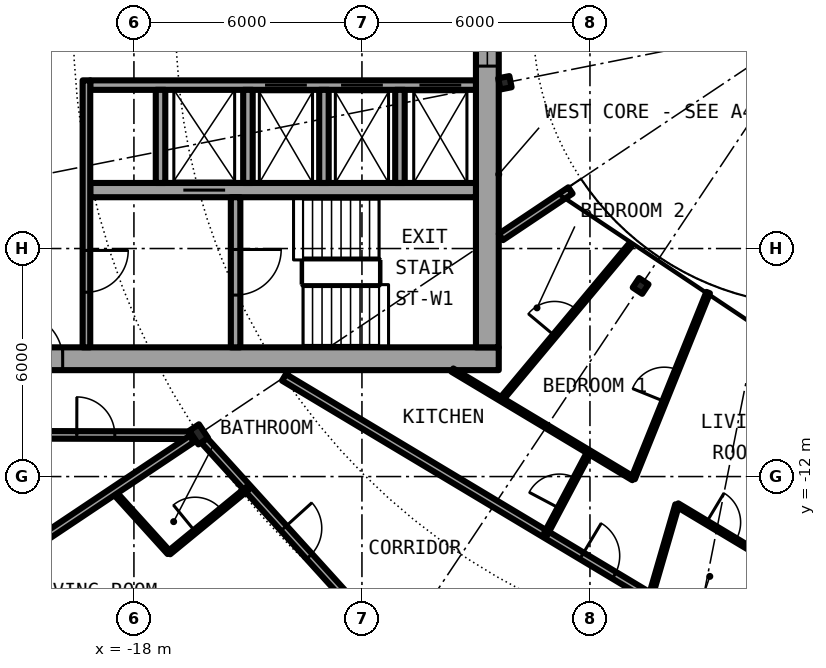
"""IFC4 building model, lengths in metres.
Left out: names, types, materials, properties, quantities, classifications, styles, units other than length and angle.
Written with IfcOpenShell. Run it as: python <this file> out.ifc"""

import sys

from ifc_helpers import new_model, si_unit, direction, frame, frame_2d, origin, origin_2d, place, context, subcontext, project, spatial, rectangle, i_section, extrude, element, fill, save


model = new_model("IFC4")
c1 = context("Model", 3, precision=1e-05, world=origin(), true_north=direction((0.0, 1.0)))
c2 = subcontext(c1, "Body", "Model", "MODEL_VIEW")
j1 = project(units=[si_unit("LENGTHUNIT", "METRE"), si_unit("PLANEANGLEUNIT", "RADIAN")], contexts=[c1])
p1 = place(None, origin())
s1 = spatial("IfcSite", under=j1, at=p1, CompositionType="ELEMENT")
p2 = place(p1, origin())
s2 = spatial("IfcBuilding", under=s1, at=p2, CompositionType="ELEMENT")
p3 = place(p2, frame((0.0, 0.0, 120.8)))
s3 = spatial("IfcBuildingStorey", under=s2, at=p3, CompositionType="ELEMENT", Elevation=120.8)
p4 = place(p3, frame((-16.297, -10.889, 0.0), z_axis=(0.0, 0.0, 1.0), x_axis=(-0.831469612303, -0.55557023302, 0.0)))
e1 = element("IfcColumn", 1, at=p4, inside=s3, PredefinedType="COLUMN", context=c2, shape_type="SweptSolid", body=[
    extrude(i_section(OverallWidth=0.307, OverallDepth=0.432, WebThickness=0.021, FlangeThickness=0.04, FilletRadius=0.027, at=origin_2d()), origin(), (0.0, 0.0, 1.0), 3.05),
])
for number, where, z_axis, x_axis in (
    (2, (-8.239, -1.639, 0.0), (0.0, 0.0, 1.0), (-0.981, -0.195, 0.0)),
    (3, (-4.667, -6.984, 0.0), (0.0, 0.0, 1.0), (-0.556, -0.831, 0.0)),
):
    element("IfcColumn", number, at=place(p3, frame(where, z_axis=z_axis, x_axis=x_axis)), inside=s3, PredefinedType="COLUMN", context=c2, shape_type="SweptSolid", body=[
        extrude(i_section(OverallWidth=0.3, OverallDepth=0.3, WebThickness=0.011, FlangeThickness=0.019, FilletRadius=0.027, at=origin_2d()), origin(), (0.0, 0.0, 1.0), 3.05),
    ])
p5 = place(p3, frame((-22.2, -8.9, 0.0), z_axis=(0.0, 0.0, 1.0), x_axis=(1.0, 0.0, 0.0)))
e4 = element("IfcWall", 4, at=p5, inside=s3, PredefinedType="SHEAR", context=c2, shape_type="SweptSolid", body=[
    extrude(rectangle(XDim=13.8, YDim=0.6, at=frame_2d((6.9, 0.0))), origin(), (0.0, 0.0, 1.0), 3.05),
])
p6 = place(p5, frame((1.125, 0.0, 0.0)))
e5 = element("IfcOpeningElement", 5, at=p6, cuts=e4, PredefinedType="OPENING", context=c2, shape_type="SweptSolid", body=[
    extrude(rectangle(XDim=1.2, YDim=2.3, at=frame_2d((0.6, 1.15))), frame((0.0, 0.31, 0.0), z_axis=(0.0, -1.0, 0.0), x_axis=(1.0, 0.0, 0.0)), (0.0, 0.0, 1.0), 0.62),
])
p7 = place(p3, frame((-8.7, 8.6, 0.0), z_axis=(0.0, 0.0, 1.0), x_axis=(0.0, -1.0, 0.0)))
e6 = element("IfcWall", 6, at=p7, inside=s3, PredefinedType="SHEAR", context=c2, shape_type="SweptSolid", body=[
    extrude(rectangle(XDim=17.2, YDim=0.6, at=frame_2d((8.6, 0.0))), origin(), (0.0, 0.0, 1.0), 3.05),
])
p8 = place(p7, frame((7.4, 0.0, 0.1)))
e7 = element("IfcOpeningElement", 7, at=p8, cuts=e6, PredefinedType="OPENING", context=c2, shape_type="SweptSolid", body=[
    extrude(rectangle(XDim=2.4, YDim=2.2, at=frame_2d((1.2, 1.1))), frame((0.0, 0.31, 0.0), z_axis=(0.0, -1.0, 0.0), x_axis=(1.0, 0.0, 0.0)), (0.0, 0.0, 1.0), 0.62),
])
p9 = place(p3, frame((-9.0, -1.7, 0.0), z_axis=(0.0, 0.0, 1.0), x_axis=(-1.0, 0.0, 0.0)))
e8 = element("IfcWall", 8, at=p9, inside=s3, PredefinedType="SHEAR", context=c2, shape_type="SweptSolid", body=[
    extrude(rectangle(XDim=10.15, YDim=0.25, at=frame_2d((5.075, 0.0))), origin(), (0.0, 0.0, 1.0), 3.05),
])
p10 = place(p9, frame((0.387, 0.0, 0.0)))
e9 = element("IfcOpeningElement", 9, at=p10, cuts=e8, PredefinedType="OPENING", context=c2, shape_type="SweptSolid", body=[
    extrude(rectangle(XDim=1.1, YDim=2.3, at=frame_2d((0.55, 1.15))), frame((0.0, 0.135, 0.0), z_axis=(0.0, -1.0, 0.0), x_axis=(1.0, 0.0, 0.0)), (0.0, 0.0, 1.0), 0.27),
])
p11 = place(p9, frame((2.45, 0.0, 0.0)))
e10 = element("IfcOpeningElement", 10, at=p11, cuts=e8, PredefinedType="OPENING", context=c2, shape_type="SweptSolid", body=[
    extrude(rectangle(XDim=1.1, YDim=2.3, at=frame_2d((0.55, 1.15))), frame((0.0, 0.135, 0.0), z_axis=(0.0, -1.0, 0.0), x_axis=(1.0, 0.0, 0.0)), (0.0, 0.0, 1.0), 0.27),
])
p12 = place(p9, frame((4.45, 0.0, 0.0)))
e11 = element("IfcOpeningElement", 11, at=p12, cuts=e8, PredefinedType="OPENING", context=c2, shape_type="SweptSolid", body=[
    extrude(rectangle(XDim=1.1, YDim=2.3, at=frame_2d((0.55, 1.15))), frame((0.0, 0.135, 0.0), z_axis=(0.0, -1.0, 0.0), x_axis=(1.0, 0.0, 0.0)), (0.0, 0.0, 1.0), 0.27),
])
p13 = place(p3, frame((-9.0, -4.462, 0.0), z_axis=(0.0, 0.0, 1.0), x_axis=(-1.0, 0.0, 0.0)))
e12 = element("IfcWall", 12, at=p13, inside=s3, PredefinedType="SHEAR", context=c2, shape_type="SweptSolid", body=[
    extrude(rectangle(XDim=10.15, YDim=0.375, at=frame_2d((5.075, 0.0))), origin(), (0.0, 0.0, 1.0), 3.05),
])
p14 = place(p13, frame((6.6, 0.0, 0.0)))
e13 = element("IfcOpeningElement", 13, at=p14, cuts=e12, PredefinedType="OPENING", context=c2, shape_type="SweptSolid", body=[
    extrude(rectangle(XDim=1.1, YDim=2.3, at=frame_2d((0.55, 1.15))), frame((0.0, 0.198, 0.0), z_axis=(0.0, -1.0, 0.0), x_axis=(1.0, 0.0, 0.0)), (0.0, 0.0, 1.0), 0.395),
])
p15 = place(p3, frame((-15.325, -4.65, 0.0), z_axis=(0.0, 0.0, 1.0), x_axis=(0.0, -1.0, 0.0)))
e14 = element("IfcWall", 14, at=p15, inside=s3, PredefinedType="SHEAR", context=c2, shape_type="SweptSolid", body=[
    extrude(rectangle(XDim=3.95, YDim=0.25, at=frame_2d((1.975, 0.0))), origin(), (0.0, 0.0, 1.0), 3.05),
])
p16 = place(p15, frame((1.375, 0.0, 0.0)))
e15 = element("IfcOpeningElement", 15, at=p16, cuts=e14, PredefinedType="OPENING", context=c2, shape_type="SweptSolid", body=[
    extrude(rectangle(XDim=1.2, YDim=2.3, at=frame_2d((0.6, 1.15))), frame((0.0, 0.135, 0.0), z_axis=(0.0, -1.0, 0.0), x_axis=(1.0, 0.0, 0.0)), (0.0, 0.0, 1.0), 0.27),
])
for number, where, z_axis, x_axis in (
    (16, (-15.0, -1.825, 0.0), (0.0, 0.0, 1.0), (0.0, -1.0, 0.0)),
    (17, (-17.3, -1.825, 0.0), (0.0, 0.0, 1.0), (0.0, -1.0, 0.0)),
):
    element("IfcWall", number, at=place(p3, frame(where, z_axis=z_axis, x_axis=x_axis)), inside=s3, PredefinedType="SOLIDWALL", context=c2, shape_type="SweptSolid", body=[
        extrude(rectangle(XDim=2.45, YDim=0.25, at=frame_2d((1.225, 0.0))), origin(), (0.0, 0.0, 1.0), 2.7),
    ])
p17 = place(p3, frame((-19.25, -1.575, 0.0), z_axis=(0.0, 0.0, 1.0), x_axis=(0.0, -1.0, 0.0)))
e18 = element("IfcWall", 18, at=p17, inside=s3, PredefinedType="SOLIDWALL", context=c2, shape_type="SweptSolid", body=[
    extrude(rectangle(XDim=7.025, YDim=0.2, at=frame_2d((3.513, 0.0))), origin(), (0.0, 0.0, 1.0), 2.7),
])
p18 = place(p17, frame((4.475, 0.0, 0.0)))
e19 = element("IfcOpeningElement", 19, at=p18, cuts=e18, PredefinedType="OPENING", context=c2, shape_type="SweptSolid", body=[
    extrude(rectangle(XDim=1.1, YDim=2.3, at=frame_2d((0.55, 1.15))), frame((0.0, 0.11, 0.0), z_axis=(0.0, -1.0, 0.0), x_axis=(1.0, 0.0, 0.0)), (0.0, 0.0, 1.0), 0.22),
])
for number, where, z_axis, x_axis in (
    (20, (-11.0, -1.825, 0.0), (0.0, 0.0, 1.0), (0.0, -1.0, 0.0)),
    (21, (-13.0, -1.825, 0.0), (0.0, 0.0, 1.0), (0.0, -1.0, 0.0)),
):
    element("IfcWall", number, at=place(p3, frame(where, z_axis=z_axis, x_axis=x_axis)), inside=s3, PredefinedType="SOLIDWALL", context=c2, shape_type="SweptSolid", body=[
        extrude(rectangle(XDim=2.45, YDim=0.25, at=frame_2d((1.225, 0.0))), origin(), (0.0, 0.0, 1.0), 2.7),
    ])
p19 = place(p3, frame((-18.542, -12.389, 0.0), z_axis=(0.0, 0.0, 1.0), x_axis=(0.671396556615, -0.741098282123, 0.0)))
e22 = element("IfcWall", 22, at=p19, inside=s3, PredefinedType="PARTITIONING", context=c2, shape_type="SweptSolid", body=[
    extrude(rectangle(XDim=2.182, YDim=0.1, at=frame_2d((1.091, 0.0))), origin(), (0.0, 0.0, 1.0), 2.7),
])
p20 = place(p3, frame((-16.192, -11.004, 0.0), z_axis=(0.0, 0.0, 1.0), x_axis=(0.671481997275, -0.741020868354, 0.0)))
e23 = element("IfcWall", 23, at=p20, inside=s3, PredefinedType="PARTITIONING", context=c2, shape_type="SweptSolid", body=[
    extrude(rectangle(XDim=5.596, YDim=0.2, at=frame_2d((2.798, 0.0))), origin(), (0.0, 0.0, 1.0), 2.39),
])
p21 = place(p20, frame((3.179, 0.0, 0.0)))
e24 = element("IfcOpeningElement", 24, at=p21, cuts=e23, PredefinedType="OPENING", context=c2, shape_type="SweptSolid", body=[
    extrude(rectangle(XDim=1.0, YDim=2.3, at=frame_2d((0.5, 1.15))), frame((0.0, 0.11, 0.0), z_axis=(0.0, -1.0, 0.0), x_axis=(1.0, 0.0, 0.0)), (0.0, 0.0, 1.0), 0.22),
])
p22 = place(p3, frame((-14.051, -9.391, 0.0), z_axis=(0.0, 0.0, 1.0), x_axis=(0.857768591583, -0.514036033069, 0.0)))
e25 = element("IfcWall", 25, at=p22, inside=s3, PredefinedType="PARTITIONING", context=c2, shape_type="SweptSolid", body=[
    extrude(rectangle(XDim=14.45, YDim=0.2, at=frame_2d((7.225, 0.0))), origin(), (0.0, 0.0, 1.0), 2.7),
])
p23 = place(p22, frame((9.133, 0.0, 0.0)))
e26 = element("IfcOpeningElement", 26, at=p23, cuts=e25, PredefinedType="OPENING", context=c2, shape_type="SweptSolid", body=[
    extrude(rectangle(XDim=1.0, YDim=2.3, at=frame_2d((0.5, 1.15))), frame((0.0, 0.11, 0.0), z_axis=(0.0, -1.0, 0.0), x_axis=(1.0, 0.0, 0.0)), (0.0, 0.0, 1.0), 0.22),
])
p24 = place(p3, frame((-9.621, -9.199, 0.0), z_axis=(0.0, 0.0, 1.0), x_axis=(0.857698539053, -0.514152911211, 0.0)))
e27 = element("IfcWall", 27, at=p24, inside=s3, PredefinedType="PARTITIONING", context=c2, shape_type="SweptSolid", body=[
    extrude(rectangle(XDim=5.551, YDim=0.1, at=frame_2d((2.775, 0.0))), origin(), (0.0, 0.0, 1.0), 2.7),
])
p25 = place(p3, frame((-3.702, -12.747, 0.0), z_axis=(0.0, 0.0, 1.0), x_axis=(0.85772440305, -0.514109763001, 0.0)))
e28 = element("IfcWall", 28, at=p25, inside=s3, PredefinedType="PARTITIONING", context=c2, shape_type="SweptSolid", body=[
    extrude(rectangle(XDim=2.698, YDim=0.1, at=frame_2d((1.349, 0.0))), origin(), (0.0, 0.0, 1.0), 2.7),
])
p26 = place(p25, frame((0.894, 0.0, 0.0)))
e29 = element("IfcOpeningElement", 29, at=p26, cuts=e28, PredefinedType="OPENING", context=c2, shape_type="SweptSolid", body=[
    extrude(rectangle(XDim=0.9, YDim=2.3, at=frame_2d((0.45, 1.15))), frame((0.0, 0.06, 0.0), z_axis=(0.0, -1.0, 0.0), x_axis=(1.0, 0.0, 0.0)), (0.0, 0.0, 1.0), 0.12),
])
p27 = place(p3, frame((-21.675, -10.9, 0.0), z_axis=(0.0, 0.0, 1.0), x_axis=(0.999997173357, -0.002377662213, 0.0)))
e30 = element("IfcWall", 30, at=p27, inside=s3, PredefinedType="PARTITIONING", context=c2, shape_type="SweptSolid", body=[
    extrude(rectangle(XDim=5.134, YDim=0.2, at=frame_2d((2.567, 0.0))), origin(), (0.0, 0.0, 1.0), 2.7),
])
p28 = place(p27, frame((2.171, 0.0, 0.0)))
e31 = element("IfcOpeningElement", 31, at=p28, cuts=e30, PredefinedType="OPENING", context=c2, shape_type="SweptSolid", body=[
    extrude(rectangle(XDim=1.0, YDim=2.3, at=frame_2d((0.5, 1.15))), frame((0.0, 0.11, 0.0), z_axis=(0.0, -1.0, 0.0), x_axis=(1.0, 0.0, 0.0)), (0.0, 0.0, 1.0), 0.22),
])
p29 = place(p3, frame((-6.513, -4.472, 0.0), z_axis=(0.0, 0.0, 1.0), x_axis=(-0.831333375071, -0.555774072347, 0.0)))
e32 = element("IfcWall", 32, at=p29, inside=s3, PredefinedType="PARTITIONING", context=c2, shape_type="SweptSolid", body=[
    extrude(rectangle(XDim=2.203, YDim=0.2, at=frame_2d((1.101, 0.0))), origin(), (0.0, 0.0, 1.0), 2.7),
])
p30 = place(p3, frame((-22.595, -15.097, 0.0), z_axis=(0.0, 0.0, 1.0), x_axis=(0.831467903109, 0.555572791, 0.0)))
e33 = element("IfcWall", 33, at=p30, inside=s3, PredefinedType="PARTITIONING", context=c2, shape_type="SweptSolid", body=[
    extrude(rectangle(XDim=7.358, YDim=0.2, at=frame_2d((3.679, 0.0))), origin(), (0.0, 0.0, 1.0), 2.7),
])
p31 = place(p3, frame((-17.077, -14.006, 0.0), z_axis=(0.0, 0.0, 1.0), x_axis=(0.77319617123, 0.634166918717, 0.0)))
e34 = element("IfcWall", 34, at=p31, inside=s3, PredefinedType="PARTITIONING", context=c2, shape_type="SweptSolid", body=[
    extrude(rectangle(XDim=2.675, YDim=0.1, at=frame_2d((1.337, 0.0))), origin(), (0.0, 0.0, 1.0), 2.7),
])
p32 = place(p31, frame((0.887, 0.0, 0.0)))
e35 = element("IfcOpeningElement", 35, at=p32, cuts=e34, PredefinedType="OPENING", context=c2, shape_type="SweptSolid", body=[
    extrude(rectangle(XDim=0.9, YDim=2.3, at=frame_2d((0.45, 1.15))), frame((0.0, 0.06, 0.0), z_axis=(0.0, -1.0, 0.0), x_axis=(1.0, 0.0, 0.0)), (0.0, 0.0, 1.0), 0.12),
])
p33 = place(p3, frame((-8.335, -9.97, 0.0), z_axis=(0.0, 0.0, 1.0), x_axis=(0.641376424834, 0.767226356213, 0.0)))
e36 = element("IfcWall", 36, at=p33, inside=s3, PredefinedType="PARTITIONING", context=c2, shape_type="SweptSolid", body=[
    extrude(rectangle(XDim=5.275, YDim=0.1, at=frame_2d((2.637, 0.0))), origin(), (0.0, 0.0, 1.0), 2.7),
])
p34 = place(p33, frame((2.187, 0.0, 0.0)))
e37 = element("IfcOpeningElement", 37, at=p34, cuts=e36, PredefinedType="OPENING", context=c2, shape_type="SweptSolid", body=[
    extrude(rectangle(XDim=0.9, YDim=2.3, at=frame_2d((0.45, 1.15))), frame((0.0, 0.06, 0.0), z_axis=(0.0, -1.0, 0.0), x_axis=(1.0, 0.0, 0.0)), (0.0, 0.0, 1.0), 0.12),
])
p35 = place(p3, frame((-7.166, -13.517, 0.0), z_axis=(0.0, 0.0, 1.0), x_axis=(0.468337293896, 0.883549760425, 0.0)))
e38 = element("IfcWall", 38, at=p35, inside=s3, PredefinedType="PARTITIONING", context=c2, shape_type="SweptSolid", body=[
    extrude(rectangle(XDim=2.445, YDim=0.1, at=frame_2d((1.222, 0.0))), origin(), (0.0, 0.0, 1.0), 2.7),
])
p36 = place(p35, frame((0.772, 0.0, 0.0)))
e39 = element("IfcOpeningElement", 39, at=p36, cuts=e38, PredefinedType="OPENING", context=c2, shape_type="SweptSolid", body=[
    extrude(rectangle(XDim=0.9, YDim=2.3, at=frame_2d((0.45, 1.15))), frame((0.0, 0.06, 0.0), z_axis=(0.0, -1.0, 0.0), x_axis=(1.0, 0.0, 0.0)), (0.0, 0.0, 1.0), 0.12),
])
p37 = place(p3, frame((-4.864, -12.051, 0.0), z_axis=(0.0, 0.0, 1.0), x_axis=(0.374372761824, 0.927278294367, 0.0)))
e40 = element("IfcWall", 40, at=p37, inside=s3, PredefinedType="PARTITIONING", context=c2, shape_type="SweptSolid", body=[
    extrude(rectangle(XDim=5.276, YDim=0.1, at=frame_2d((2.638, 0.0))), origin(), (0.0, 0.0, 1.0), 2.7),
])
p38 = place(p37, frame((2.188, 0.0, 0.0)))
e41 = element("IfcOpeningElement", 41, at=p38, cuts=e40, PredefinedType="OPENING", context=c2, shape_type="SweptSolid", body=[
    extrude(rectangle(XDim=0.9, YDim=2.3, at=frame_2d((0.45, 1.15))), frame((0.0, 0.06, 0.0), z_axis=(0.0, -1.0, 0.0), x_axis=(1.0, 0.0, 0.0)), (0.0, 0.0, 1.0), 0.12),
])
p39 = place(p3, frame((-4.411, -15.168, 0.0), z_axis=(0.0, 0.0, 1.0), x_axis=(0.279201466266, 0.960232545395, 0.0)))
e42 = element("IfcWall", 42, at=p39, inside=s3, PredefinedType="PARTITIONING", context=c2, shape_type="SweptSolid", body=[
    extrude(rectangle(XDim=2.524, YDim=0.1, at=frame_2d((1.262, 0.0))), origin(), (0.0, 0.0, 1.0), 2.7),
])
p40 = place(p10, origin())
e43 = element("IfcDoor", 43, at=p40, inside=s3, OperationType="DOUBLE_DOOR_SLIDING", PredefinedType="DOOR", context=c2, shape_type="SweptSolid", body=[
    extrude(rectangle(XDim=1.1, YDim=2.3, at=frame_2d((0.55, 1.15))), frame((0.0, 0.025, 0.0), z_axis=(0.0, -1.0, 0.0), x_axis=(1.0, 0.0, 0.0)), (0.0, 0.0, 1.0), 0.05),
])
fill(e9, e43)
p41 = place(p11, origin())
e44 = element("IfcDoor", 44, at=p41, inside=s3, OperationType="DOUBLE_DOOR_SLIDING", PredefinedType="DOOR", context=c2, shape_type="SweptSolid", body=[
    extrude(rectangle(XDim=1.1, YDim=2.3, at=frame_2d((0.55, 1.15))), frame((0.0, 0.025, 0.0), z_axis=(0.0, -1.0, 0.0), x_axis=(1.0, 0.0, 0.0)), (0.0, 0.0, 1.0), 0.05),
])
fill(e10, e44)
p42 = place(p12, origin())
e45 = element("IfcDoor", 45, at=p42, inside=s3, OperationType="DOUBLE_DOOR_SLIDING", PredefinedType="DOOR", context=c2, shape_type="SweptSolid", body=[
    extrude(rectangle(XDim=1.1, YDim=2.3, at=frame_2d((0.55, 1.15))), frame((0.0, 0.025, 0.0), z_axis=(0.0, -1.0, 0.0), x_axis=(1.0, 0.0, 0.0)), (0.0, 0.0, 1.0), 0.05),
])
fill(e11, e45)
p43 = place(p14, origin())
e46 = element("IfcDoor", 46, at=p43, inside=s3, OperationType="DOUBLE_DOOR_SLIDING", PredefinedType="DOOR", context=c2, shape_type="SweptSolid", body=[
    extrude(rectangle(XDim=1.1, YDim=2.3, at=frame_2d((0.55, 1.15))), frame((0.0, 0.025, 0.0), z_axis=(0.0, -1.0, 0.0), x_axis=(1.0, 0.0, 0.0)), (0.0, 0.0, 1.0), 0.05),
])
fill(e13, e46)
p44 = place(p16, origin())
e47 = element("IfcDoor", 47, at=p44, inside=s3, OperationType="SINGLE_SWING_LEFT", PredefinedType="DOOR", context=c2, shape_type="SweptSolid", body=[
    extrude(rectangle(XDim=1.2, YDim=2.3, at=frame_2d((0.6, 1.15))), frame((0.0, 0.025, 0.0), z_axis=(0.0, -1.0, 0.0), x_axis=(1.0, 0.0, 0.0)), (0.0, 0.0, 1.0), 0.05),
])
fill(e15, e47)
p45 = place(p18, origin())
e48 = element("IfcDoor", 48, at=p45, inside=s3, OperationType="SINGLE_SWING_LEFT", PredefinedType="DOOR", context=c2, shape_type="SweptSolid", body=[
    extrude(rectangle(XDim=1.1, YDim=2.3, at=frame_2d((0.55, 1.15))), frame((0.0, 0.025, 0.0), z_axis=(0.0, -1.0, 0.0), x_axis=(1.0, 0.0, 0.0)), (0.0, 0.0, 1.0), 0.05),
])
fill(e19, e48)
p46 = place(p6, origin())
e49 = element("IfcDoor", 49, at=p46, inside=s3, OperationType="SINGLE_SWING_RIGHT", PredefinedType="DOOR", context=c2, shape_type="SweptSolid", body=[
    extrude(rectangle(XDim=1.2, YDim=2.3, at=frame_2d((0.6, 1.15))), frame((0.0, 0.025, 0.0), z_axis=(0.0, -1.0, 0.0), x_axis=(1.0, 0.0, 0.0)), (0.0, 0.0, 1.0), 0.05),
])
fill(e5, e49)
p47 = place(p8, origin())
e50 = element("IfcWindow", 50, at=p47, inside=s3, PartitioningType="SINGLE_PANEL", PredefinedType="WINDOW", context=c2, shape_type="SweptSolid", body=[
    extrude(rectangle(XDim=2.4, YDim=2.2, at=frame_2d((1.2, 1.1))), frame((0.0, 0.03, 0.0), z_axis=(0.0, -1.0, 0.0), x_axis=(1.0, 0.0, 0.0)), (0.0, 0.0, 1.0), 0.06),
])
fill(e7, e50)
p48 = place(p21, origin())
e51 = element("IfcDoor", 51, at=p48, inside=s3, OperationType="SINGLE_SWING_RIGHT", PredefinedType="DOOR", context=c2, shape_type="SweptSolid", body=[
    extrude(rectangle(XDim=1.0, YDim=2.3, at=frame_2d((0.5, 1.15))), frame((0.0, 0.025, 0.0), z_axis=(0.0, -1.0, 0.0), x_axis=(1.0, 0.0, 0.0)), (0.0, 0.0, 1.0), 0.05),
])
fill(e24, e51)
p49 = place(p32, origin())
e52 = element("IfcDoor", 52, at=p49, inside=s3, OperationType="SINGLE_SWING_LEFT", PredefinedType="DOOR", context=c2, shape_type="SweptSolid", body=[
    extrude(rectangle(XDim=0.9, YDim=2.3, at=frame_2d((0.45, 1.15))), frame((0.0, 0.025, 0.0), z_axis=(0.0, -1.0, 0.0), x_axis=(1.0, 0.0, 0.0)), (0.0, 0.0, 1.0), 0.05),
])
fill(e35, e52)
p50 = place(p23, origin())
e53 = element("IfcDoor", 53, at=p50, inside=s3, OperationType="SINGLE_SWING_RIGHT", PredefinedType="DOOR", context=c2, shape_type="SweptSolid", body=[
    extrude(rectangle(XDim=1.0, YDim=2.3, at=frame_2d((0.5, 1.15))), frame((0.0, 0.025, 0.0), z_axis=(0.0, -1.0, 0.0), x_axis=(1.0, 0.0, 0.0)), (0.0, 0.0, 1.0), 0.05),
])
fill(e26, e53)
p51 = place(p26, origin())
e54 = element("IfcDoor", 54, at=p51, inside=s3, OperationType="SINGLE_SWING_LEFT", PredefinedType="DOOR", context=c2, shape_type="SweptSolid", body=[
    extrude(rectangle(XDim=0.9, YDim=2.3, at=frame_2d((0.45, 1.15))), frame((0.0, 0.025, 0.0), z_axis=(0.0, -1.0, 0.0), x_axis=(1.0, 0.0, 0.0)), (0.0, 0.0, 1.0), 0.05),
])
fill(e29, e54)
p52 = place(p36, origin())
e55 = element("IfcDoor", 55, at=p52, inside=s3, OperationType="SINGLE_SWING_LEFT", PredefinedType="DOOR", context=c2, shape_type="SweptSolid", body=[
    extrude(rectangle(XDim=0.9, YDim=2.3, at=frame_2d((0.45, 1.15))), frame((0.0, 0.025, 0.0), z_axis=(0.0, -1.0, 0.0), x_axis=(1.0, 0.0, 0.0)), (0.0, 0.0, 1.0), 0.05),
])
fill(e39, e55)
p53 = place(p38, origin())
e56 = element("IfcDoor", 56, at=p53, inside=s3, OperationType="SINGLE_SWING_RIGHT", PredefinedType="DOOR", context=c2, shape_type="SweptSolid", body=[
    extrude(rectangle(XDim=0.9, YDim=2.3, at=frame_2d((0.45, 1.15))), frame((0.0, 0.025, 0.0), z_axis=(0.0, -1.0, 0.0), x_axis=(1.0, 0.0, 0.0)), (0.0, 0.0, 1.0), 0.05),
])
fill(e41, e56)
p54 = place(p34, origin())
e57 = element("IfcDoor", 57, at=p54, inside=s3, OperationType="SINGLE_SWING_RIGHT", PredefinedType="DOOR", context=c2, shape_type="SweptSolid", body=[
    extrude(rectangle(XDim=0.9, YDim=2.3, at=frame_2d((0.45, 1.15))), frame((0.0, 0.025, 0.0), z_axis=(0.0, -1.0, 0.0), x_axis=(1.0, 0.0, 0.0)), (0.0, 0.0, 1.0), 0.05),
])
fill(e37, e57)
p55 = place(p28, origin())
e58 = element("IfcDoor", 58, at=p55, inside=s3, OperationType="SINGLE_SWING_RIGHT", PredefinedType="DOOR", context=c2, shape_type="SweptSolid", body=[
    extrude(rectangle(XDim=1.0, YDim=2.3, at=frame_2d((0.5, 1.15))), frame((0.0, 0.025, 0.0), z_axis=(0.0, -1.0, 0.0), x_axis=(1.0, 0.0, 0.0)), (0.0, 0.0, 1.0), 0.05),
])
fill(e31, e58)
save(model, sys.argv[1])
